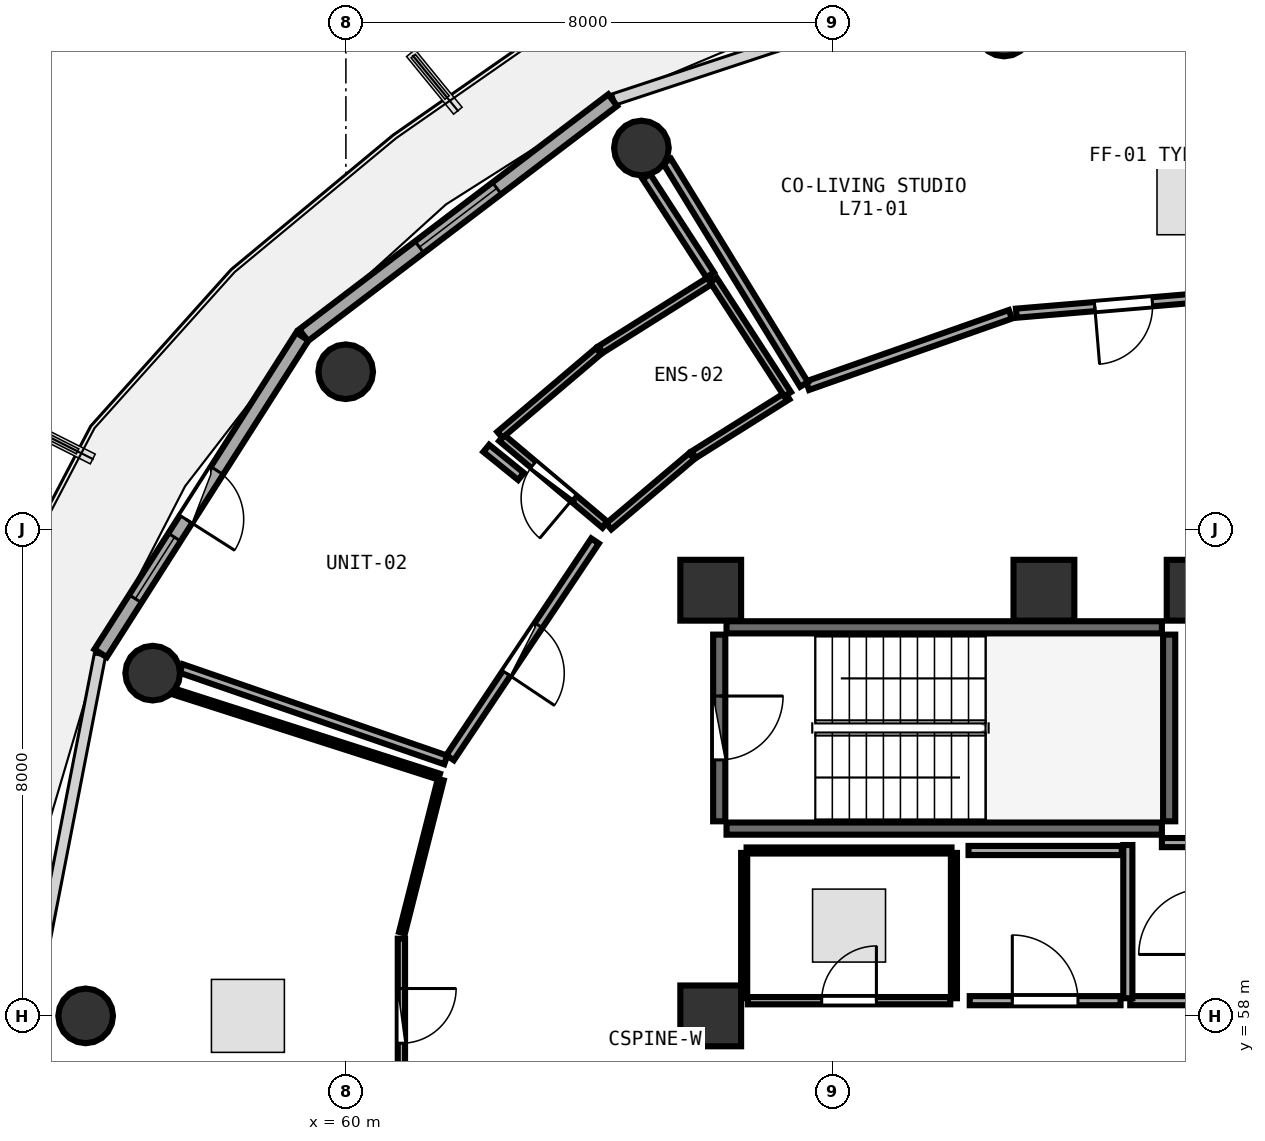
"""IFC4 building model, lengths in metres.
Left out: names, types, materials, properties, quantities, classifications, styles, units other than length and angle.
Written with IfcOpenShell. Run it as: python <this file> out.ifc"""

import sys

from ifc_helpers import new_model, si_unit, direction, frame, frame_2d, origin, origin_2d, place, context, subcontext, project, spatial, rectangle, circle, extrude, element, fill, save


model = new_model("IFC4")
c1 = context("Model", 3, precision=1e-05, world=origin(), true_north=direction((0.0, 1.0)))
c2 = subcontext(c1, "Body", "Model", "MODEL_VIEW")
j1 = project(units=[si_unit("LENGTHUNIT", "METRE"), si_unit("PLANEANGLEUNIT", "RADIAN")], contexts=[c1])
p1 = place(None, origin())
s1 = spatial("IfcSite", under=j1, at=p1, CompositionType="ELEMENT")
p2 = place(p1, origin())
s2 = spatial("IfcBuilding", under=s1, at=p2, CompositionType="ELEMENT")
p3 = place(p2, frame((0.0, 0.0, 278.7)))
s3 = spatial("IfcBuildingStorey", under=s2, at=p3, CompositionType="ELEMENT", Elevation=278.7)
for number, where, z_axis, x_axis in (
    (1, (74.0, 65.0, 0.0), (0.0, 0.0, 1.0), (1.0, 0.0, 0.0)),
    (2, (71.48, 65.0, 0.0), (0.0, 0.0, 1.0), (1.0, 0.0, 0.0)),
    (3, (66.0, 65.0, 0.0), (0.0, 0.0, 1.0), (1.0, 0.0, 0.0)),
    (4, (66.0, 58.0, 0.0), (0.0, 0.0, 1.0), (1.0, 0.0, 0.0)),
):
    element("IfcColumn", number, at=place(p3, frame(where, z_axis=z_axis, x_axis=x_axis)), inside=s3, PredefinedType="PILASTER", context=c2, shape_type="SweptSolid", body=[
        extrude(rectangle(XDim=1.0, YDim=1.0, at=origin_2d()), origin(), (0.0, 0.0, 1.0), 3.75),
    ])
for number, where, z_axis, x_axis in (
    (5, (70.826, 74.229, 0.0), (0.0, 0.0, 1.0), (1.0, 0.0, 0.0)),
    (6, (64.86, 72.272, 0.0), (0.0, 0.0, 1.0), (1.0, 0.0, 0.0)),
    (7, (59.997, 68.593, 0.0), (0.0, 0.0, 1.0), (1.0, 0.0, 0.0)),
    (8, (56.823, 63.636, 0.0), (0.0, 0.0, 1.0), (1.0, 0.0, 0.0)),
    (9, (55.72, 58.0, 0.0), (0.0, 0.0, 1.0), (1.0, 0.0, 0.0)),
):
    element("IfcColumn", number, at=place(p3, frame(where, z_axis=z_axis, x_axis=x_axis)), inside=s3, PredefinedType="COLUMN", context=c2, shape_type="SweptSolid", body=[
        extrude(circle(Radius=0.45, at=origin_2d()), origin(), (0.0, 0.0, 1.0), 3.75),
    ])
p4 = place(p3, frame((64.388, 73.06, 0.0), z_axis=(0.0, 0.0, 1.0), x_axis=(-0.796010444211, -0.605282886514, 0.0)))
e10 = element("IfcWall", 10, at=p4, inside=s3, PredefinedType="SOLIDWALL", context=c2, shape_type="SweptSolid", body=[
    extrude(rectangle(XDim=6.387, YDim=0.24, at=frame_2d((3.194, 0.0))), origin(), (0.0, 0.0, 1.0), 3.475),
])
p5 = place(p4, frame((2.394, 0.0, 0.85)))
e11 = element("IfcOpeningElement", 11, at=p5, cuts=e10, PredefinedType="OPENING", context=c2, shape_type="SweptSolid", body=[
    extrude(rectangle(XDim=1.6, YDim=1.45, at=frame_2d((0.8, 0.725))), frame((0.0, 0.13, 0.0), z_axis=(0.0, -1.0, 0.0), x_axis=(1.0, 0.0, 0.0)), (0.0, 0.0, 1.0), 0.26),
])
p6 = place(p3, frame((59.284, 69.172, 0.0), z_axis=(0.0, 0.0, 1.0), x_axis=(-0.537271968456, -0.843409053728, 0.0)))
e12 = element("IfcWall", 12, at=p6, inside=s3, PredefinedType="SOLIDWALL", context=c2, shape_type="SweptSolid", body=[
    extrude(rectangle(XDim=6.175, YDim=0.24, at=frame_2d((3.087, 0.0))), origin(), (0.0, 0.0, 1.0), 3.475),
])
p7 = place(p6, frame((2.613, 0.0, 0.0)))
e13 = element("IfcOpeningElement", 13, at=p7, cuts=e12, PredefinedType="OPENING", context=c2, shape_type="SweptSolid", body=[
    extrude(rectangle(XDim=0.95, YDim=2.1, at=frame_2d((0.475, 1.05))), frame((0.0, 0.13, 0.0), z_axis=(0.0, -1.0, 0.0), x_axis=(1.0, 0.0, 0.0)), (0.0, 0.0, 1.0), 0.26),
])
p8 = place(p6, frame((3.913, 0.0, 0.85)))
e14 = element("IfcOpeningElement", 14, at=p8, cuts=e12, PredefinedType="OPENING", context=c2, shape_type="SweptSolid", body=[
    extrude(rectangle(XDim=1.2, YDim=1.45, at=frame_2d((0.6, 0.725))), frame((0.0, 0.13, 0.0), z_axis=(0.0, -1.0, 0.0), x_axis=(1.0, 0.0, 0.0)), (0.0, 0.0, 1.0), 0.26),
])
p9 = place(p3, frame((54.803, 57.985, 0.0), z_axis=(0.0, 0.0, 1.0), x_axis=(0.190969309115, -0.981596008028, 0.0)))
e15 = element("IfcWall", 15, at=p9, inside=s3, PredefinedType="SOLIDWALL", context=c2, shape_type="SweptSolid", body=[
    extrude(rectangle(XDim=6.033, YDim=0.24, at=frame_2d((3.017, 0.0))), origin(), (0.0, 0.0, 1.0), 3.475),
])
p10 = place(p9, frame((2.216, 0.0, 0.85)))
e16 = element("IfcOpeningElement", 16, at=p10, cuts=e15, PredefinedType="OPENING", context=c2, shape_type="SweptSolid", body=[
    extrude(rectangle(XDim=1.6, YDim=1.45, at=frame_2d((0.8, 0.725))), frame((0.0, 0.13, 0.0), z_axis=(0.0, -1.0, 0.0), x_axis=(1.0, 0.0, 0.0)), (0.0, 0.0, 1.0), 0.26),
])
p11 = place(p3, frame((66.26, 61.08, 0.0), z_axis=(0.0, 0.0, 1.0), x_axis=(1.0, 0.0, 0.0)))
e17 = element("IfcWall", 17, at=p11, inside=s3, PredefinedType="SHEAR", context=c2, shape_type="SweptSolid", body=[
    extrude(rectangle(XDim=7.16, YDim=0.2, at=frame_2d((3.58, 0.0))), origin(), (0.0, 0.0, 1.0), 3.49),
])
p12 = place(p3, frame((73.54, 61.2, 0.0), z_axis=(0.0, 0.0, 1.0), x_axis=(0.0, 1.0, 0.0)))
e18 = element("IfcWall", 18, at=p12, inside=s3, PredefinedType="SHEAR", context=c2, shape_type="SweptSolid", body=[
    extrude(rectangle(XDim=3.07, YDim=0.2, at=frame_2d((1.535, 0.0))), origin(), (0.0, 0.0, 1.0), 3.49),
])
p13 = place(p3, frame((73.42, 64.39, 0.0), z_axis=(0.0, 0.0, 1.0), x_axis=(-1.0, 0.0, 0.0)))
e19 = element("IfcWall", 19, at=p13, inside=s3, PredefinedType="SHEAR", context=c2, shape_type="SweptSolid", body=[
    extrude(rectangle(XDim=7.16, YDim=0.2, at=frame_2d((3.58, 0.0))), origin(), (0.0, 0.0, 1.0), 3.49),
])
p14 = place(p3, frame((66.14, 64.27, 0.0), z_axis=(0.0, 0.0, 1.0), x_axis=(0.0, -1.0, 0.0)))
e20 = element("IfcWall", 20, at=p14, inside=s3, PredefinedType="SHEAR", context=c2, shape_type="SweptSolid", body=[
    extrude(rectangle(XDim=3.07, YDim=0.2, at=frame_2d((1.535, 0.0))), origin(), (0.0, 0.0, 1.0), 3.49),
])
p15 = place(p14, frame((1.01, 0.0, 0.0)))
e21 = element("IfcOpeningElement", 21, at=p15, cuts=e20, PredefinedType="OPENING", context=c2, shape_type="SweptSolid", body=[
    extrude(rectangle(XDim=1.05, YDim=2.1, at=frame_2d((0.525, 1.05))), frame((0.0, 0.11, 0.0), z_axis=(0.0, -1.0, 0.0), x_axis=(1.0, 0.0, 0.0)), (0.0, 0.0, 1.0), 0.22),
])
p16 = place(p3, frame((66.61, 58.25, 0.0), z_axis=(0.0, 0.0, 1.0), x_axis=(1.0, 0.0, 0.0)))
e22 = element("IfcWall", 22, at=p16, inside=s3, PredefinedType="PARTITIONING", context=c2, shape_type="SweptSolid", body=[
    extrude(rectangle(XDim=3.33, YDim=0.12, at=frame_2d((1.665, 0.0))), origin(), (0.0, 0.0, 1.0), 3.48),
])
p17 = place(p16, frame((1.215, 0.0, 0.0)))
e23 = element("IfcOpeningElement", 23, at=p17, cuts=e22, PredefinedType="OPENING", context=c2, shape_type="SweptSolid", body=[
    extrude(rectangle(XDim=0.9, YDim=2.08, at=frame_2d((0.45, 1.04))), frame((0.0, 0.07, 0.0), z_axis=(0.0, -1.0, 0.0), x_axis=(1.0, 0.0, 0.0)), (0.0, 0.0, 1.0), 0.14),
])
p18 = place(p3, frame((70.26, 58.25, 0.0), z_axis=(0.0, 0.0, 1.0), x_axis=(1.0, 0.0, 0.0)))
e24 = element("IfcWall", 24, at=p18, inside=s3, PredefinedType="PARTITIONING", context=c2, shape_type="SweptSolid", body=[
    extrude(rectangle(XDim=2.48, YDim=0.15, at=frame_2d((1.24, 0.0))), origin(), (0.0, 0.0, 1.0), 3.48),
])
p19 = place(p18, frame((0.7, 0.0, 0.0)))
e25 = element("IfcOpeningElement", 25, at=p19, cuts=e24, PredefinedType="OPENING", context=c2, shape_type="SweptSolid", body=[
    extrude(rectangle(XDim=1.08, YDim=2.1, at=frame_2d((0.54, 1.05))), frame((0.0, 0.085, 0.0), z_axis=(0.0, -1.0, 0.0), x_axis=(1.0, 0.0, 0.0)), (0.0, 0.0, 1.0), 0.17),
])
p20 = place(p3, frame((74.553, 69.852, 0.0), z_axis=(0.0, 0.0, 1.0), x_axis=(-0.996494196011, -0.083661922741, 0.0)))
e26 = element("IfcWall", 26, at=p20, inside=s3, PredefinedType="PARTITIONING", context=c2, shape_type="SweptSolid", body=[
    extrude(rectangle(XDim=3.54, YDim=0.15, at=frame_2d((1.77, 0.0))), origin(), (0.0, 0.0, 1.0), 3.075),
])
p21 = place(p20, frame((1.295, 0.0, 0.0)))
e27 = element("IfcOpeningElement", 27, at=p21, cuts=e26, PredefinedType="OPENING", context=c2, shape_type="SweptSolid", body=[
    extrude(rectangle(XDim=0.95, YDim=2.08, at=frame_2d((0.475, 1.04))), frame((0.0, 0.085, 0.0), z_axis=(0.0, -1.0, 0.0), x_axis=(1.0, 0.0, 0.0)), (0.0, 0.0, 1.0), 0.17),
])
p22 = place(p3, frame((64.262, 66.076, 0.0), z_axis=(0.0, 0.0, 1.0), x_axis=(-0.765401481213, 0.643553084491, 0.0)))
e28 = element("IfcWall", 28, at=p22, inside=s3, PredefinedType="PLUMBINGWALL", context=c2, shape_type="SweptSolid", body=[
    extrude(rectangle(XDim=2.22, YDim=0.13, at=frame_2d((1.11, 0.0))), origin(), (0.0, 0.0, 1.0), 3.075),
])
p23 = place(p22, frame((0.68, 0.0, 0.0)))
e29 = element("IfcOpeningElement", 29, at=p23, cuts=e28, PredefinedType="OPENING", context=c2, shape_type="SweptSolid", body=[
    extrude(rectangle(XDim=0.86, YDim=2.05, at=frame_2d((0.43, 1.025))), frame((0.0, 0.075, 0.0), z_axis=(0.0, -1.0, 0.0), x_axis=(1.0, 0.0, 0.0)), (0.0, 0.0, 1.0), 0.15),
])
p24 = place(p3, frame((64.098, 65.81, 0.0), z_axis=(0.0, 0.0, 1.0), x_axis=(-0.556013356557, -0.831173355763, 0.0)))
e30 = element("IfcWall", 30, at=p24, inside=s3, PredefinedType="PARTITIONING", context=c2, shape_type="SweptSolid", body=[
    extrude(rectangle(XDim=4.288, YDim=0.15, at=frame_2d((2.144, 0.0))), origin(), (0.0, 0.0, 1.0), 3.075),
])
p25 = place(p24, frame((1.669, 0.0, 0.0)))
e31 = element("IfcOpeningElement", 31, at=p25, cuts=e30, PredefinedType="OPENING", context=c2, shape_type="SweptSolid", body=[
    extrude(rectangle(XDim=0.95, YDim=2.08, at=frame_2d((0.475, 1.04))), frame((0.0, 0.085, 0.0), z_axis=(0.0, -1.0, 0.0), x_axis=(1.0, 0.0, 0.0)), (0.0, 0.0, 1.0), 0.17),
])
p26 = place(p3, frame((60.913, 59.27, 0.0), z_axis=(0.0, 0.0, 1.0), x_axis=(0.0, -1.0, 0.0)))
e32 = element("IfcWall", 32, at=p26, inside=s3, PredefinedType="PARTITIONING", context=c2, shape_type="SweptSolid", body=[
    extrude(rectangle(XDim=2.54, YDim=0.12, at=frame_2d((1.27, 0.0))), origin(), (0.0, 0.0, 1.0), 3.075),
])
p27 = place(p26, frame((0.82, 0.0, 0.0)))
e33 = element("IfcOpeningElement", 33, at=p27, cuts=e32, PredefinedType="OPENING", context=c2, shape_type="SweptSolid", body=[
    extrude(rectangle(XDim=0.9, YDim=2.08, at=frame_2d((0.45, 1.04))), frame((0.0, 0.07, 0.0), z_axis=(0.0, -1.0, 0.0), x_axis=(1.0, 0.0, 0.0)), (0.0, 0.0, 1.0), 0.14),
])
p28 = place(p3, frame((72.9, 58.25, 0.0), z_axis=(0.0, 0.0, 1.0), x_axis=(1.0, 0.0, 0.0)))
e34 = element("IfcWall", 34, at=p28, inside=s3, PredefinedType="PARTITIONING", context=c2, shape_type="SweptSolid", body=[
    extrude(rectangle(XDim=1.18, YDim=0.15, at=frame_2d((0.59, 0.0))), origin(), (0.0, 0.0, 1.0), 3.48),
])
p29 = place(p3, frame((74.08, 60.85, 0.0), z_axis=(0.0, 0.0, 1.0), x_axis=(-1.0, 0.0, 0.0)))
e35 = element("IfcWall", 35, at=p29, inside=s3, PredefinedType="PARTITIONING", context=c2, shape_type="SweptSolid", body=[
    extrude(rectangle(XDim=0.66, YDim=0.15, at=frame_2d((0.33, 0.0))), origin(), (0.0, 0.0, 1.0), 3.48),
])
p30 = place(p3, frame((72.86, 60.81, 0.0), z_axis=(0.0, 0.0, 1.0), x_axis=(0.0, -1.0, 0.0)))
e36 = element("IfcWall", 36, at=p30, inside=s3, PredefinedType="PARTITIONING", context=c2, shape_type="SweptSolid", body=[
    extrude(rectangle(XDim=2.52, YDim=0.15, at=frame_2d((1.26, 0.0))), origin(), (0.0, 0.0, 1.0), 3.48),
])
p31 = place(p3, frame((70.0, 58.29, 0.0), z_axis=(0.0, 0.0, 1.0), x_axis=(0.0, 1.0, 0.0)))
e37 = element("IfcWall", 37, at=p31, inside=s3, PredefinedType="PARTITIONING", context=c2, shape_type="SweptSolid", body=[
    extrude(rectangle(XDim=2.39, YDim=0.1, at=frame_2d((1.195, 0.0))), origin(), (0.0, 0.0, 1.0), 3.48),
])
p32 = place(p3, frame((69.96, 60.72, 0.0), z_axis=(0.0, 0.0, 1.0), x_axis=(-1.0, 0.0, 0.0)))
e38 = element("IfcWall", 38, at=p32, inside=s3, PredefinedType="PARTITIONING", context=c2, shape_type="SweptSolid", body=[
    extrude(rectangle(XDim=3.37, YDim=0.1, at=frame_2d((1.685, 0.0))), origin(), (0.0, 0.0, 1.0), 3.48),
])
p33 = place(p3, frame((66.55, 60.68, 0.0), z_axis=(0.0, 0.0, 1.0), x_axis=(0.0, -1.0, 0.0)))
e39 = element("IfcWall", 39, at=p33, inside=s3, PredefinedType="PARTITIONING", context=c2, shape_type="SweptSolid", body=[
    extrude(rectangle(XDim=2.39, YDim=0.1, at=frame_2d((1.195, 0.0))), origin(), (0.0, 0.0, 1.0), 3.48),
])
p34 = place(p3, frame((72.76, 60.72, 0.0), z_axis=(0.0, 0.0, 1.0), x_axis=(-1.0, 0.0, 0.0)))
e40 = element("IfcWall", 40, at=p34, inside=s3, PredefinedType="PARTITIONING", context=c2, shape_type="SweptSolid", body=[
    extrude(rectangle(XDim=2.52, YDim=0.15, at=frame_2d((1.26, 0.0))), origin(), (0.0, 0.0, 1.0), 3.48),
])
p35 = place(p3, frame((70.928, 69.538, 0.0), z_axis=(0.0, 0.0, 1.0), x_axis=(-0.943334007166, -0.331844769319, 0.0)))
e41 = element("IfcWall", 41, at=p35, inside=s3, PredefinedType="PARTITIONING", context=c2, shape_type="SweptSolid", body=[
    extrude(rectangle(XDim=3.536, YDim=0.15, at=frame_2d((1.768, 0.0))), origin(), (0.0, 0.0, 1.0), 3.48),
])
p36 = place(p3, frame((67.534, 68.385, 0.0), z_axis=(0.0, 0.0, 1.0), x_axis=(-0.522784059663, 0.852465147066, 0.0)))
e42 = element("IfcWall", 42, at=p36, inside=s3, PredefinedType="PARTITIONING", context=c2, shape_type="SweptSolid", body=[
    extrude(rectangle(XDim=4.306, YDim=0.15, at=frame_2d((2.153, 0.0))), origin(), (0.0, 0.0, 1.0), 3.175),
])
p37 = place(p3, frame((67.259, 68.195, 0.0), z_axis=(0.0, 0.0, 1.0), x_axis=(-0.84687872573, -0.531786069681, 0.0)))
e43 = element("IfcWall", 43, at=p37, inside=s3, PredefinedType="PLUMBINGWALL", context=c2, shape_type="SweptSolid", body=[
    extrude(rectangle(XDim=1.816, YDim=0.13, at=frame_2d((0.908, 0.0))), origin(), (0.0, 0.0, 1.0), 3.075),
])
p38 = place(p3, frame((65.689, 67.206, 0.0), z_axis=(0.0, 0.0, 1.0), x_axis=(-0.763153333227, -0.646217447911, 0.0)))
e44 = element("IfcWall", 44, at=p38, inside=s3, PredefinedType="PLUMBINGWALL", context=c2, shape_type="SweptSolid", body=[
    extrude(rectangle(XDim=1.789, YDim=0.13, at=frame_2d((0.895, 0.0))), origin(), (0.0, 0.0, 1.0), 3.075),
])
p39 = place(p3, frame((62.532, 67.556, 0.0), z_axis=(0.0, 0.0, 1.0), x_axis=(0.762363442866, 0.647149118042, 0.0)))
e45 = element("IfcWall", 45, at=p39, inside=s3, PredefinedType="PLUMBINGWALL", context=c2, shape_type="SweptSolid", body=[
    extrude(rectangle(XDim=2.13, YDim=0.13, at=frame_2d((1.065, 0.0))), origin(), (0.0, 0.0, 1.0), 3.48),
])
p40 = place(p3, frame((64.188, 68.958, 0.0), z_axis=(0.0, 0.0, 1.0), x_axis=(0.846317763279, 0.532678367833, 0.0)))
e46 = element("IfcWall", 46, at=p40, inside=s3, PredefinedType="PLUMBINGWALL", context=c2, shape_type="SweptSolid", body=[
    extrude(rectangle(XDim=2.16, YDim=0.13, at=frame_2d((1.08, 0.0))), origin(), (0.0, 0.0, 1.0), 3.075),
])
p41 = place(p3, frame((66.044, 70.102, 0.0), z_axis=(0.0, 0.0, 1.0), x_axis=(0.544858166378, -0.838528221667, 0.0)))
e47 = element("IfcWall", 47, at=p41, inside=s3, PredefinedType="PLUMBINGWALL", context=c2, shape_type="SweptSolid", body=[
    extrude(rectangle(XDim=2.241, YDim=0.13, at=frame_2d((1.121, 0.0))), origin(), (0.0, 0.0, 1.0), 3.175),
])
p42 = place(p3, frame((61.642, 62.209, 0.0), z_axis=(0.0, 0.0, 1.0), x_axis=(-0.945103281494, 0.326771766388, 0.0)))
e48 = element("IfcWall", 48, at=p42, inside=s3, PredefinedType="PARTITIONING", context=c2, shape_type="SweptSolid", body=[
    extrude(rectangle(XDim=4.604, YDim=0.15, at=frame_2d((2.302, 0.0))), origin(), (0.0, 0.0, 1.0), 3.075),
])
p43 = place(p3, frame((64.942, 71.804, 0.0), z_axis=(0.0, 0.0, 1.0), x_axis=(0.54428503198, -0.838900354013, 0.0)))
e49 = element("IfcWall", 49, at=p43, inside=s3, PredefinedType="PARTITIONING", context=c2, shape_type="SweptSolid", body=[
    extrude(rectangle(XDim=1.928, YDim=0.15, at=frame_2d((0.964, 0.0))), origin(), (0.0, 0.0, 1.0), 3.075),
])
p44 = place(p3, frame((62.308, 67.334, 0.0), z_axis=(0.0, 0.0, 1.0), x_axis=(0.777554041087, -0.628816120332, 0.0)))
e50 = element("IfcWall", 50, at=p44, inside=s3, PredefinedType="PARTITIONING", context=c2, shape_type="SweptSolid", body=[
    extrude(rectangle(XDim=0.735, YDim=0.15, at=frame_2d((0.368, 0.0))), origin(), (0.0, 0.0, 1.0), 3.075),
])
p45 = place(p3, frame((61.56, 61.884, 0.0), z_axis=(0.0, 0.0, 1.0), x_axis=(-0.245655775867, -0.969357127061, 0.0)))
e51 = element("IfcWall", 51, at=p45, inside=s3, PredefinedType="PARTITIONING", context=c2, shape_type="SweptSolid", body=[
    extrude(rectangle(XDim=2.595, YDim=0.1, at=frame_2d((1.297, 0.0))), origin(), (0.0, 0.0, 1.0), 3.48),
])
p46 = place(p3, frame((57.184, 63.329, 0.0), z_axis=(0.0, 0.0, 1.0), x_axis=(0.95227750557, -0.305233602976, 0.0)))
e52 = element("IfcWall", 52, at=p46, inside=s3, PredefinedType="PARTITIONING", context=c2, shape_type="SweptSolid", body=[
    extrude(rectangle(XDim=4.565, YDim=0.1, at=frame_2d((2.283, 0.0))), origin(), (0.0, 0.0, 1.0), 3.175),
])
p47 = place(p5, origin())
e53 = element("IfcWindow", 53, at=p47, inside=s3, PartitioningType="SINGLE_PANEL", PredefinedType="WINDOW", context=c2, shape_type="SweptSolid", body=[
    extrude(rectangle(XDim=1.6, YDim=1.45, at=frame_2d((0.8, 0.725))), frame((0.0, 0.03, 0.0), z_axis=(0.0, -1.0, 0.0), x_axis=(1.0, 0.0, 0.0)), (0.0, 0.0, 1.0), 0.06),
])
fill(e11, e53)
p48 = place(p7, frame((0.95, 0.0, 0.0), z_axis=(0.0, 0.0, 1.0), x_axis=(-1.0, 0.0, 0.0)))
e54 = element("IfcDoor", 54, at=p48, inside=s3, OperationType="SINGLE_SWING_LEFT", PredefinedType="DOOR", context=c2, shape_type="SweptSolid", body=[
    extrude(rectangle(XDim=0.95, YDim=2.1, at=frame_2d((0.475, 1.05))), frame((0.0, 0.025, 0.0), z_axis=(0.0, -1.0, 0.0), x_axis=(1.0, 0.0, 0.0)), (0.0, 0.0, 1.0), 0.05),
])
fill(e13, e54)
p49 = place(p8, origin())
e55 = element("IfcWindow", 55, at=p49, inside=s3, PartitioningType="SINGLE_PANEL", PredefinedType="WINDOW", context=c2, shape_type="SweptSolid", body=[
    extrude(rectangle(XDim=1.2, YDim=1.45, at=frame_2d((0.6, 0.725))), frame((0.0, 0.03, 0.0), z_axis=(0.0, -1.0, 0.0), x_axis=(1.0, 0.0, 0.0)), (0.0, 0.0, 1.0), 0.06),
])
fill(e14, e55)
p50 = place(p15, origin())
e56 = element("IfcDoor", 56, at=p50, inside=s3, OperationType="SINGLE_SWING_LEFT", PredefinedType="DOOR", context=c2, shape_type="SweptSolid", body=[
    extrude(rectangle(XDim=1.05, YDim=2.1, at=frame_2d((0.525, 1.05))), frame((0.0, 0.025, 0.0), z_axis=(0.0, -1.0, 0.0), x_axis=(1.0, 0.0, 0.0)), (0.0, 0.0, 1.0), 0.05),
])
fill(e21, e56)
p51 = place(p17, origin())
e57 = element("IfcDoor", 57, at=p51, inside=s3, OperationType="SINGLE_SWING_RIGHT", PredefinedType="DOOR", context=c2, shape_type="SweptSolid", body=[
    extrude(rectangle(XDim=0.9, YDim=2.08, at=frame_2d((0.45, 1.04))), frame((0.0, 0.025, 0.0), z_axis=(0.0, -1.0, 0.0), x_axis=(1.0, 0.0, 0.0)), (0.0, 0.0, 1.0), 0.05),
])
fill(e23, e57)
p52 = place(p19, origin())
e58 = element("IfcDoor", 58, at=p52, inside=s3, OperationType="SINGLE_SWING_LEFT", PredefinedType="DOOR", context=c2, shape_type="SweptSolid", body=[
    extrude(rectangle(XDim=1.08, YDim=2.1, at=frame_2d((0.54, 1.05))), frame((0.0, 0.025, 0.0), z_axis=(0.0, -1.0, 0.0), x_axis=(1.0, 0.0, 0.0)), (0.0, 0.0, 1.0), 0.05),
])
fill(e25, e58)
p53 = place(p21, origin())
e59 = element("IfcDoor", 59, at=p53, inside=s3, OperationType="SINGLE_SWING_RIGHT", PredefinedType="DOOR", context=c2, shape_type="SweptSolid", body=[
    extrude(rectangle(XDim=0.95, YDim=2.08, at=frame_2d((0.475, 1.04))), frame((0.0, 0.025, 0.0), z_axis=(0.0, -1.0, 0.0), x_axis=(1.0, 0.0, 0.0)), (0.0, 0.0, 1.0), 0.05),
])
fill(e27, e59)
p54 = place(p23, origin())
e60 = element("IfcDoor", 60, at=p54, inside=s3, OperationType="SINGLE_SWING_LEFT", PredefinedType="DOOR", context=c2, shape_type="SweptSolid", body=[
    extrude(rectangle(XDim=0.86, YDim=2.05, at=frame_2d((0.43, 1.025))), frame((0.0, 0.025, 0.0), z_axis=(0.0, -1.0, 0.0), x_axis=(1.0, 0.0, 0.0)), (0.0, 0.0, 1.0), 0.05),
])
fill(e29, e60)
p55 = place(p25, origin())
e61 = element("IfcDoor", 61, at=p55, inside=s3, OperationType="SINGLE_SWING_RIGHT", PredefinedType="DOOR", context=c2, shape_type="SweptSolid", body=[
    extrude(rectangle(XDim=0.95, YDim=2.08, at=frame_2d((0.475, 1.04))), frame((0.0, 0.025, 0.0), z_axis=(0.0, -1.0, 0.0), x_axis=(1.0, 0.0, 0.0)), (0.0, 0.0, 1.0), 0.05),
])
fill(e31, e61)
p56 = place(p27, origin())
e62 = element("IfcDoor", 62, at=p56, inside=s3, OperationType="SINGLE_SWING_LEFT", PredefinedType="DOOR", context=c2, shape_type="SweptSolid", body=[
    extrude(rectangle(XDim=0.9, YDim=2.08, at=frame_2d((0.45, 1.04))), frame((0.0, 0.025, 0.0), z_axis=(0.0, -1.0, 0.0), x_axis=(1.0, 0.0, 0.0)), (0.0, 0.0, 1.0), 0.05),
])
fill(e33, e62)
save(model, sys.argv[1])
